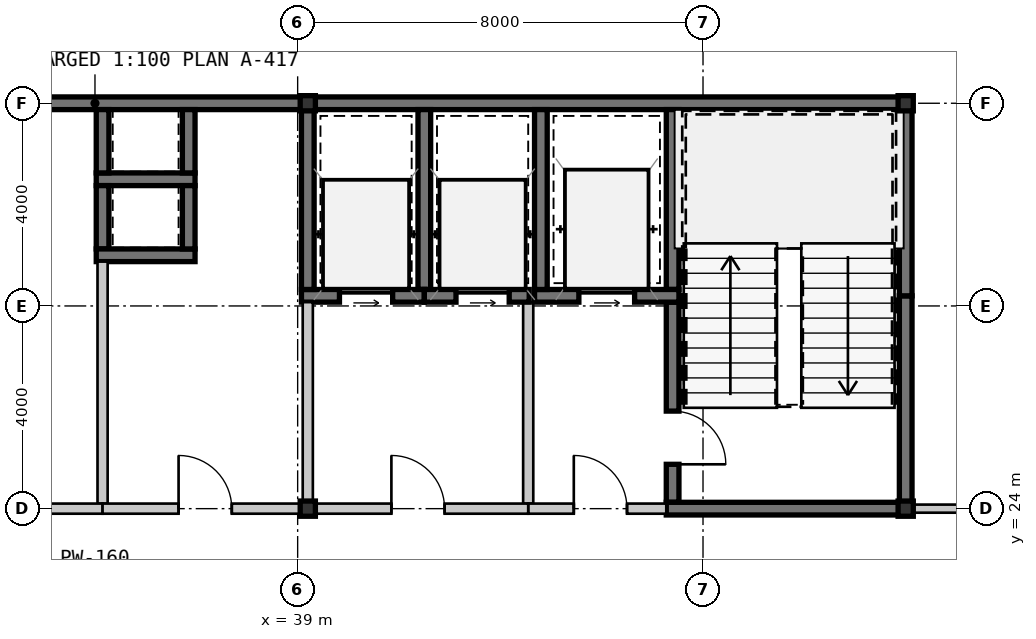
"""IFC4 building model, lengths in metres.
Left out: names, types, materials, properties, quantities, classifications, styles, units other than length and angle.
Written with IfcOpenShell. Run it as: python <this file> out.ifc"""

import sys

from ifc_helpers import new_model, si_unit, direction, frame, frame_2d, origin, origin_2d, place, context, subcontext, project, spatial, rectangle, hollow_rectangle, extrude, source, transform, mapped, element, fill, save


model = new_model("IFC4")
c1 = context("Model", 3, precision=1e-05, world=origin(), true_north=direction((0.0, 1.0)))
c2 = subcontext(c1, "Body", "Model", "MODEL_VIEW")
j1 = project(units=[si_unit("LENGTHUNIT", "METRE"), si_unit("PLANEANGLEUNIT", "RADIAN")], contexts=[c1])
p1 = place(None, origin())
s1 = spatial("IfcSite", under=j1, at=p1, CompositionType="ELEMENT")
p2 = place(p1, origin())
s2 = spatial("IfcBuilding", under=s1, at=p2, CompositionType="ELEMENT")
p3 = place(p2, frame((0.0, 0.0, 236.6)))
s3 = spatial("IfcBuildingStorey", under=s2, at=p3, CompositionType="ELEMENT", Elevation=236.6)
m1 = source(origin(), c2, "Body", "SweptSolid", [
    extrude(hollow_rectangle(XDim=0.3, YDim=0.3, WallThickness=0.012, at=origin_2d()), origin(), (0.0, 0.0, 1.0), 3.15),
])
for number, where, z_axis, x_axis in (
    (1, (39.2, 24.0, 0.0), (0.0, 0.0, 1.0), (1.0, 0.0, 0.0)),
    (2, (51.0, 24.0, 0.0), (0.0, 0.0, 1.0), (1.0, 0.0, 0.0)),
    (3, (39.2, 32.0, 0.0), (0.0, 0.0, 1.0), (1.0, 0.0, 0.0)),
    (4, (51.0, 32.0, 0.0), (0.0, 0.0, 1.0), (1.0, 0.0, 0.0)),
):
    element("IfcColumn", number, at=place(p3, frame(where, z_axis=z_axis, x_axis=x_axis)), inside=s3, PredefinedType="COLUMN", context=c2, shape_type="MappedRepresentation", body=[
        mapped(m1, transform((0.0, 0.0, 0.0), scale=1.0)),
    ])
m2 = source(origin(), c2, "Body", "SweptSolid", [
    extrude(rectangle(XDim=11.2, YDim=0.25, at=frame_2d((5.6, 0.0))), origin(), (0.0, 0.0, 1.0), 2.93),
])
p4 = place(p3, frame((28.0, 32.0, 0.0), z_axis=(0.0, 0.0, 1.0), x_axis=(1.0, 0.0, 0.0)))
e5 = element("IfcWall", 5, at=p4, inside=s3, PredefinedType="SHEAR", context=c2, shape_type="MappedRepresentation", body=[
    mapped(m2, transform((0.0, 0.0, 0.0), scale=1.0)),
])
m3 = source(origin(), c2, "Body", "SweptSolid", [
    extrude(rectangle(XDim=11.925, YDim=0.25, at=frame_2d((5.962, 0.0))), origin(), (0.0, 0.0, 1.0), 2.93),
])
p5 = place(p3, frame((39.2, 32.0, 0.0), z_axis=(0.0, 0.0, 1.0), x_axis=(1.0, 0.0, 0.0)))
e6 = element("IfcWall", 6, at=p5, inside=s3, PredefinedType="SHEAR", context=c2, shape_type="MappedRepresentation", body=[
    mapped(m3, transform((0.0, 0.0, 0.0), scale=1.0)),
])
m4 = source(origin(), c2, "Body", "SweptSolid", [
    extrude(rectangle(XDim=4.075, YDim=0.25, at=frame_2d((2.038, 0.0))), origin(), (0.0, 0.0, 1.0), 2.93),
])
p6 = place(p3, frame((51.0, 24.125, 0.0), z_axis=(0.0, 0.0, 1.0), x_axis=(0.0, 1.0, 0.0)))
e7 = element("IfcWall", 7, at=p6, inside=s3, PredefinedType="SHEAR", context=c2, shape_type="MappedRepresentation", body=[
    mapped(m4, transform((0.0, 0.0, 0.0), scale=1.0)),
])
m5 = source(origin(), c2, "Body", "SweptSolid", [
    extrude(rectangle(XDim=3.675, YDim=0.25, at=frame_2d((1.837, 0.0))), origin(), (0.0, 0.0, 1.0), 2.93),
])
p7 = place(p3, frame((51.0, 28.2, 0.0), z_axis=(0.0, 0.0, 1.0), x_axis=(0.0, 1.0, 0.0)))
e8 = element("IfcWall", 8, at=p7, inside=s3, PredefinedType="SHEAR", context=c2, shape_type="MappedRepresentation", body=[
    mapped(m5, transform((0.0, 0.0, 0.0), scale=1.0)),
])
m6 = source(origin(), c2, "Body", "SweptSolid", [
    extrude(rectangle(XDim=3.55, YDim=0.25, at=frame_2d((1.775, 0.0))), origin(), (0.0, 0.0, 1.0), 2.93),
])
p8 = place(p3, frame((46.4, 31.875, 0.0), z_axis=(0.0, 0.0, 1.0), x_axis=(0.0, -1.0, 0.0)))
e9 = element("IfcWall", 9, at=p8, inside=s3, PredefinedType="SHEAR", context=c2, shape_type="MappedRepresentation", body=[
    mapped(m6, transform((0.0, 0.0, 0.0), scale=1.0)),
])
m7 = source(origin(), c2, "Body", "SweptSolid", [
    extrude(rectangle(XDim=3.95, YDim=0.25, at=frame_2d((1.975, 0.0))), origin(), (0.0, 0.0, 1.0), 2.93),
])
p9 = place(p3, frame((46.4, 28.075, 0.0), z_axis=(0.0, 0.0, 1.0), x_axis=(0.0, -1.0, 0.0)))
e10 = element("IfcWall", 10, at=p9, inside=s3, PredefinedType="SHEAR", context=c2, shape_type="MappedRepresentation", body=[
    mapped(m7, transform((0.0, 0.0, 0.0), scale=1.0)),
])
m8 = source(origin(), c2, "Body", "SweptSolid", [
    extrude(rectangle(XDim=1.05, YDim=2.1, at=frame_2d((0.525, 1.05))), frame((0.0, 0.135, 0.0), z_axis=(0.0, -1.0, 0.0), x_axis=(1.0, 0.0, 0.0)), (0.0, 0.0, 1.0), 0.27),
])
p10 = place(p9, frame((2.15, 0.0, 0.0)))
e11 = element("IfcOpeningElement", 11, at=p10, cuts=e10, PredefinedType="OPENING", context=c2, shape_type="MappedRepresentation", body=[
    mapped(m8, transform((0.0, 0.0, 0.0), scale=1.0)),
])
m9 = source(origin(), c2, "Body", "SweptSolid", [
    extrude(rectangle(XDim=4.85, YDim=0.25, at=frame_2d((2.425, 0.0))), origin(), (0.0, 0.0, 1.0), 2.93),
])
p11 = place(p3, frame((46.275, 24.0, 0.0), z_axis=(0.0, 0.0, 1.0), x_axis=(1.0, 0.0, 0.0)))
e12 = element("IfcWall", 12, at=p11, inside=s3, PredefinedType="SHEAR", context=c2, shape_type="MappedRepresentation", body=[
    mapped(m9, transform((0.0, 0.0, 0.0), scale=1.0)),
])
m10 = source(origin(), c2, "Body", "SweptSolid", [
    extrude(rectangle(XDim=2.85, YDim=0.25, at=frame_2d((1.425, 0.0))), origin(), (0.0, 0.0, 1.0), 2.93),
])
p12 = place(p3, frame((43.675, 28.2, 0.0), z_axis=(0.0, 0.0, 1.0), x_axis=(1.0, 0.0, 0.0)))
e13 = element("IfcWall", 13, at=p12, inside=s3, PredefinedType="SHEAR", context=c2, shape_type="MappedRepresentation", body=[
    mapped(m10, transform((0.0, 0.0, 0.0), scale=1.0)),
])
m11 = source(origin(), c2, "Body", "SweptSolid", [
    extrude(rectangle(XDim=1.1, YDim=2.15, at=frame_2d((0.55, 1.075))), frame((0.0, 0.135, 0.0), z_axis=(0.0, -1.0, 0.0), x_axis=(1.0, 0.0, 0.0)), (0.0, 0.0, 1.0), 0.27),
])
p13 = place(p12, frame((0.875, 0.0, 0.0)))
e14 = element("IfcOpeningElement", 14, at=p13, cuts=e13, PredefinedType="OPENING", context=c2, shape_type="MappedRepresentation", body=[
    mapped(m11, transform((0.0, 0.0, 0.0), scale=1.0)),
])
p14 = place(p3, frame((43.8, 31.875, 0.0), z_axis=(0.0, 0.0, 1.0), x_axis=(0.0, -1.0, 0.0)))
e15 = element("IfcWall", 15, at=p14, inside=s3, PredefinedType="SHEAR", context=c2, shape_type="MappedRepresentation", body=[
    mapped(m6, transform((0.0, 0.0, 0.0), scale=1.0)),
])
m12 = source(origin(), c2, "Body", "SweptSolid", [
    extrude(rectangle(XDim=3.975, YDim=0.2, at=frame_2d((1.987, 0.0))), origin(), (0.0, 0.0, 1.0), 2.93),
])
p15 = place(p3, frame((43.55, 28.075, 0.0), z_axis=(0.0, 0.0, 1.0), x_axis=(0.0, -1.0, 0.0)))
e16 = element("IfcWall", 16, at=p15, inside=s3, PredefinedType="SOLIDWALL", context=c2, shape_type="MappedRepresentation", body=[
    mapped(m12, transform((0.0, 0.0, 0.0), scale=1.0)),
])
m13 = source(origin(), c2, "Body", "SweptSolid", [
    extrude(rectangle(XDim=2.725, YDim=0.2, at=frame_2d((1.362, 0.0))), origin(), (0.0, 0.0, 1.0), 2.397),
])
p16 = place(p3, frame((43.55, 24.0, 0.0), z_axis=(0.0, 0.0, 1.0), x_axis=(1.0, 0.0, 0.0)))
e17 = element("IfcWall", 17, at=p16, inside=s3, PredefinedType="SOLIDWALL", context=c2, shape_type="MappedRepresentation", body=[
    mapped(m13, transform((0.0, 0.0, 0.0), scale=1.0)),
])
m14 = source(origin(), c2, "Body", "SweptSolid", [
    extrude(rectangle(XDim=1.05, YDim=2.1, at=frame_2d((0.525, 1.05))), frame((0.0, 0.11, 0.0), z_axis=(0.0, -1.0, 0.0), x_axis=(1.0, 0.0, 0.0)), (0.0, 0.0, 1.0), 0.22),
])
p17 = place(p16, frame((0.9, 0.0, 0.0)))
e18 = element("IfcOpeningElement", 18, at=p17, cuts=e17, PredefinedType="OPENING", context=c2, shape_type="MappedRepresentation", body=[
    mapped(m14, transform((0.0, 0.0, 0.0), scale=1.0)),
])
m15 = source(origin(), c2, "Body", "SweptSolid", [
    extrude(rectangle(XDim=1.95, YDim=0.25, at=frame_2d((0.975, 0.0))), origin(), (0.0, 0.0, 1.0), 2.93),
])
p18 = place(p3, frame((35.025, 30.5, 0.0), z_axis=(0.0, 0.0, 1.0), x_axis=(1.0, 0.0, 0.0)))
e19 = element("IfcWall", 19, at=p18, inside=s3, PredefinedType="SHEAR", context=c2, shape_type="MappedRepresentation", body=[
    mapped(m15, transform((0.0, 0.0, 0.0), scale=1.0)),
])
m16 = source(origin(), c2, "Body", "SweptSolid", [
    extrude(rectangle(XDim=1.25, YDim=0.25, at=frame_2d((0.625, 0.0))), origin(), (0.0, 0.0, 1.0), 2.93),
])
for number, where, z_axis, x_axis in (
    (20, (35.15, 31.875, 0.0), (0.0, 0.0, 1.0), (0.0, -1.0, 0.0)),
    (21, (36.85, 30.625, 0.0), (0.0, 0.0, 1.0), (0.0, 1.0, 0.0)),
    (22, (35.15, 30.375, 0.0), (0.0, 0.0, 1.0), (0.0, -1.0, 0.0)),
):
    element("IfcWall", number, at=place(p3, frame(where, z_axis=z_axis, x_axis=x_axis)), inside=s3, PredefinedType="SHEAR", context=c2, shape_type="MappedRepresentation", body=[
        mapped(m16, transform((0.0, 0.0, 0.0), scale=1.0)),
    ])
p19 = place(p3, frame((35.025, 29.0, 0.0), z_axis=(0.0, 0.0, 1.0), x_axis=(1.0, 0.0, 0.0)))
e23 = element("IfcWall", 23, at=p19, inside=s3, PredefinedType="SHEAR", context=c2, shape_type="MappedRepresentation", body=[
    mapped(m15, transform((0.0, 0.0, 0.0), scale=1.0)),
])
p20 = place(p3, frame((36.85, 29.125, 0.0), z_axis=(0.0, 0.0, 1.0), x_axis=(0.0, 1.0, 0.0)))
e24 = element("IfcWall", 24, at=p20, inside=s3, PredefinedType="SHEAR", context=c2, shape_type="MappedRepresentation", body=[
    mapped(m16, transform((0.0, 0.0, 0.0), scale=1.0)),
])
p21 = place(p3, frame((41.5, 28.325, 0.0), z_axis=(0.0, 0.0, 1.0), x_axis=(0.0, 1.0, 0.0)))
e25 = element("IfcWall", 25, at=p21, inside=s3, PredefinedType="SHEAR", context=c2, shape_type="MappedRepresentation", body=[
    mapped(m6, transform((0.0, 0.0, 0.0), scale=1.0)),
])
m17 = source(origin(), c2, "Body", "SweptSolid", [
    extrude(rectangle(XDim=2.425, YDim=0.25, at=frame_2d((1.212, 0.0))), origin(), (0.0, 0.0, 1.0), 2.93),
])
p22 = place(p3, frame((39.075, 28.2, 0.0), z_axis=(0.0, 0.0, 1.0), x_axis=(1.0, 0.0, 0.0)))
e26 = element("IfcWall", 26, at=p22, inside=s3, PredefinedType="SHEAR", context=c2, shape_type="MappedRepresentation", body=[
    mapped(m17, transform((0.0, 0.0, 0.0), scale=1.0)),
])
m18 = source(origin(), c2, "Body", "SweptSolid", [
    extrude(rectangle(XDim=1.05, YDim=2.15, at=frame_2d((0.525, 1.075))), frame((0.0, 0.135, 0.0), z_axis=(0.0, -1.0, 0.0), x_axis=(1.0, 0.0, 0.0)), (0.0, 0.0, 1.0), 0.27),
])
p23 = place(p22, frame((0.75, 0.0, 0.0)))
e27 = element("IfcOpeningElement", 27, at=p23, cuts=e26, PredefinedType="OPENING", context=c2, shape_type="MappedRepresentation", body=[
    mapped(m18, transform((0.0, 0.0, 0.0), scale=1.0)),
])
p24 = place(p3, frame((39.2, 31.875, 0.0), z_axis=(0.0, 0.0, 1.0), x_axis=(0.0, -1.0, 0.0)))
e28 = element("IfcWall", 28, at=p24, inside=s3, PredefinedType="SHEAR", context=c2, shape_type="MappedRepresentation", body=[
    mapped(m6, transform((0.0, 0.0, 0.0), scale=1.0)),
])
m19 = source(origin(), c2, "Body", "SweptSolid", [
    extrude(rectangle(XDim=2.07, YDim=0.25, at=frame_2d((1.035, 0.0))), origin(), (0.0, 0.0, 1.0), 2.93),
])
p25 = place(p3, frame((41.5, 28.2, 0.0), z_axis=(0.0, 0.0, 1.0), x_axis=(1.0, 0.0, 0.0)))
e29 = element("IfcWall", 29, at=p25, inside=s3, PredefinedType="SHEAR", context=c2, shape_type="MappedRepresentation", body=[
    mapped(m19, transform((0.0, 0.0, 0.0), scale=1.0)),
])
p26 = place(p25, frame((0.625, 0.0, 0.0)))
e30 = element("IfcOpeningElement", 30, at=p26, cuts=e29, PredefinedType="OPENING", context=c2, shape_type="MappedRepresentation", body=[
    mapped(m18, transform((0.0, 0.0, 0.0), scale=1.0)),
])
m20 = source(origin(), c2, "Body", "SweptSolid", [
    extrude(rectangle(XDim=3.975, YDim=0.2, at=frame_2d((1.987, 0.0))), origin(), (0.0, 0.0, 1.0), 2.47),
])
p27 = place(p3, frame((39.2, 24.1, 0.0), z_axis=(0.0, 0.0, 1.0), x_axis=(0.0, 1.0, 0.0)))
e31 = element("IfcWall", 31, at=p27, inside=s3, PredefinedType="SOLIDWALL", context=c2, shape_type="MappedRepresentation", body=[
    mapped(m20, transform((0.0, 0.0, 0.0), scale=1.0)),
])
m21 = source(origin(), c2, "Body", "SweptSolid", [
    extrude(rectangle(XDim=4.35, YDim=0.2, at=frame_2d((2.175, 0.0))), origin(), (0.0, 0.0, 1.0), 2.397),
])
p28 = place(p3, frame((43.55, 24.0, 0.0), z_axis=(0.0, 0.0, 1.0), x_axis=(-1.0, 0.0, 0.0)))
e32 = element("IfcWall", 32, at=p28, inside=s3, PredefinedType="SOLIDWALL", context=c2, shape_type="MappedRepresentation", body=[
    mapped(m21, transform((0.0, 0.0, 0.0), scale=1.0)),
])
p29 = place(p28, frame((1.65, 0.0, 0.0)))
e33 = element("IfcOpeningElement", 33, at=p29, cuts=e32, PredefinedType="OPENING", context=c2, shape_type="MappedRepresentation", body=[
    mapped(m14, transform((0.0, 0.0, 0.0), scale=1.0)),
])
m22 = source(origin(), c2, "Body", "SweptSolid", [
    extrude(rectangle(XDim=4.775, YDim=0.2, at=frame_2d((2.387, 0.0))), origin(), (0.0, 0.0, 1.0), 2.93),
])
p30 = place(p3, frame((35.15, 28.875, 0.0), z_axis=(0.0, 0.0, 1.0), x_axis=(0.0, -1.0, 0.0)))
e34 = element("IfcWall", 34, at=p30, inside=s3, PredefinedType="SOLIDWALL", context=c2, shape_type="MappedRepresentation", body=[
    mapped(m22, transform((0.0, 0.0, 0.0), scale=1.0)),
])
m23 = source(origin(), c2, "Body", "SweptSolid", [
    extrude(rectangle(XDim=8.7, YDim=0.2, at=frame_2d((4.35, 0.0))), origin(), (0.0, 0.0, 1.0), 2.47),
])
p31 = place(p3, frame((35.15, 24.0, 0.0), z_axis=(0.0, 0.0, 1.0), x_axis=(-1.0, 0.0, 0.0)))
e35 = element("IfcWall", 35, at=p31, inside=s3, PredefinedType="SOLIDWALL", context=c2, shape_type="MappedRepresentation", body=[
    mapped(m23, transform((0.0, 0.0, 0.0), scale=1.0)),
])
p32 = place(p31, frame((3.825, 0.0, 0.0)))
e36 = element("IfcOpeningElement", 36, at=p32, cuts=e35, PredefinedType="OPENING", context=c2, shape_type="MappedRepresentation", body=[
    mapped(m14, transform((0.0, 0.0, 0.0), scale=1.0)),
])
m24 = source(origin(), c2, "Body", "SweptSolid", [
    extrude(rectangle(XDim=4.05, YDim=0.2, at=frame_2d((2.025, 0.0))), origin(), (0.0, 0.0, 1.0), 2.47),
])
p33 = place(p3, frame((39.2, 24.0, 0.0), z_axis=(0.0, 0.0, 1.0), x_axis=(-1.0, 0.0, 0.0)))
e37 = element("IfcWall", 37, at=p33, inside=s3, PredefinedType="SOLIDWALL", context=c2, shape_type="MappedRepresentation", body=[
    mapped(m24, transform((0.0, 0.0, 0.0), scale=1.0)),
])
p34 = place(p33, frame((1.5, 0.0, 0.0)))
e38 = element("IfcOpeningElement", 38, at=p34, cuts=e37, PredefinedType="OPENING", context=c2, shape_type="MappedRepresentation", body=[
    mapped(m14, transform((0.0, 0.0, 0.0), scale=1.0)),
])
m25 = source(origin(), c2, "Body", "SweptSolid", [
    extrude(rectangle(XDim=6.378, YDim=0.16, at=frame_2d((3.189, 0.0))), origin(), (0.0, 0.0, 1.0), 2.93),
])
p35 = place(p3, frame((51.125, 24.0, 0.0), z_axis=(0.0, 0.0, 1.0), x_axis=(1.0, 0.0, 0.0)))
e39 = element("IfcWall", 39, at=p35, inside=s3, PredefinedType="PARTITIONING", context=c2, shape_type="MappedRepresentation", body=[
    mapped(m25, transform((0.0, 0.0, 0.0), scale=1.0)),
])
m26 = source(origin(), c2, "Body", "SweptSolid", [
    extrude(rectangle(XDim=0.92, YDim=2.1, at=frame_2d((0.46, 1.05))), frame((0.0, 0.09, 0.0), z_axis=(0.0, -1.0, 0.0), x_axis=(1.0, 0.0, 0.0)), (0.0, 0.0, 1.0), 0.18),
])
p36 = place(p35, frame((2.677, 0.0, 0.0)))
e40 = element("IfcOpeningElement", 40, at=p36, cuts=e39, PredefinedType="OPENING", context=c2, shape_type="MappedRepresentation", body=[
    mapped(m26, transform((0.0, 0.0, 0.0), scale=1.0)),
])
m27 = source(origin(), c2, "Body", "SweptSolid", [
    extrude(rectangle(XDim=1.05, YDim=2.1, at=frame_2d((0.525, 1.05))), frame((0.0, 0.025, 0.0), z_axis=(0.0, -1.0, 0.0), x_axis=(1.0, 0.0, 0.0)), (0.0, 0.0, 1.0), 0.05),
])
p37 = place(p10, origin())
e41 = element("IfcDoor", 41, at=p37, inside=s3, OperationType="SINGLE_SWING_RIGHT", PredefinedType="DOOR", context=c2, shape_type="MappedRepresentation", body=[
    mapped(m27, transform((0.0, 0.0, 0.0), scale=1.0)),
])
fill(e11, e41)
m28 = source(origin(), c2, "Body", "SweptSolid", [
    extrude(rectangle(XDim=1.1, YDim=2.15, at=frame_2d((0.55, 1.075))), frame((0.0, 0.025, 0.0), z_axis=(0.0, -1.0, 0.0), x_axis=(1.0, 0.0, 0.0)), (0.0, 0.0, 1.0), 0.05),
])
p38 = place(p13, origin())
e42 = element("IfcDoor", 42, at=p38, inside=s3, OperationType="SLIDING_TO_LEFT", PredefinedType="DOOR", context=c2, shape_type="MappedRepresentation", body=[
    mapped(m28, transform((0.0, 0.0, 0.0), scale=1.0)),
])
fill(e14, e42)
p39 = place(p17, origin())
e43 = element("IfcDoor", 43, at=p39, inside=s3, OperationType="SINGLE_SWING_LEFT", PredefinedType="DOOR", context=c2, shape_type="MappedRepresentation", body=[
    mapped(m27, transform((0.0, 0.0, 0.0), scale=1.0)),
])
fill(e18, e43)
m29 = source(origin(), c2, "Body", "SweptSolid", [
    extrude(rectangle(XDim=1.05, YDim=2.15, at=frame_2d((0.525, 1.075))), frame((0.0, 0.025, 0.0), z_axis=(0.0, -1.0, 0.0), x_axis=(1.0, 0.0, 0.0)), (0.0, 0.0, 1.0), 0.05),
])
p40 = place(p23, origin())
e44 = element("IfcDoor", 44, at=p40, inside=s3, OperationType="SLIDING_TO_LEFT", PredefinedType="DOOR", context=c2, shape_type="MappedRepresentation", body=[
    mapped(m29, transform((0.0, 0.0, 0.0), scale=1.0)),
])
fill(e27, e44)
p41 = place(p26, origin())
e45 = element("IfcDoor", 45, at=p41, inside=s3, OperationType="SLIDING_TO_LEFT", PredefinedType="DOOR", context=c2, shape_type="MappedRepresentation", body=[
    mapped(m29, transform((0.0, 0.0, 0.0), scale=1.0)),
])
fill(e30, e45)
p42 = place(p29, frame((1.05, 0.0, 0.0), z_axis=(0.0, 0.0, 1.0), x_axis=(-1.0, 0.0, 0.0)))
e46 = element("IfcDoor", 46, at=p42, inside=s3, OperationType="SINGLE_SWING_LEFT", PredefinedType="DOOR", context=c2, shape_type="MappedRepresentation", body=[
    mapped(m27, transform((0.0, 0.0, 0.0), scale=1.0)),
])
fill(e33, e46)
p43 = place(p34, frame((1.05, 0.0, 0.0), z_axis=(0.0, 0.0, 1.0), x_axis=(-1.0, 0.0, 0.0)))
e47 = element("IfcDoor", 47, at=p43, inside=s3, OperationType="SINGLE_SWING_LEFT", PredefinedType="DOOR", context=c2, shape_type="MappedRepresentation", body=[
    mapped(m27, transform((0.0, 0.0, 0.0), scale=1.0)),
])
fill(e38, e47)
save(model, sys.argv[1])
